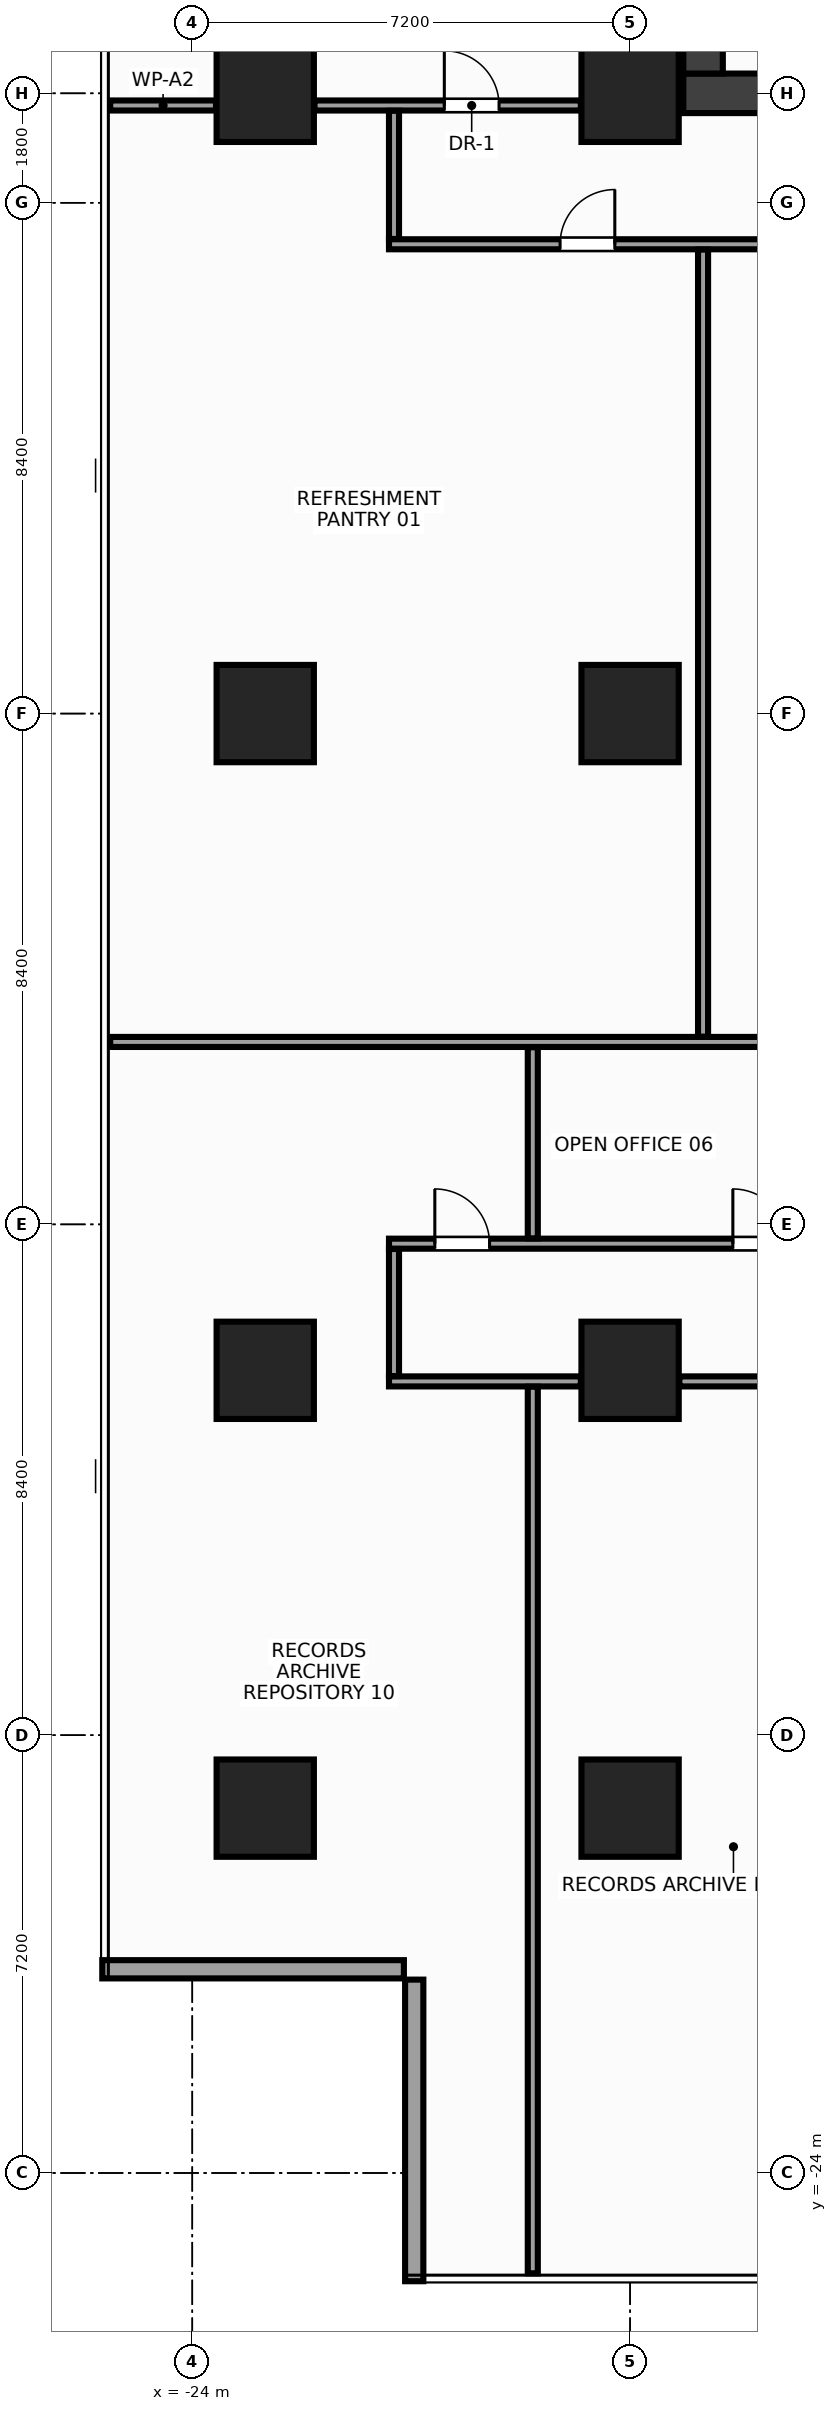
"""IFC4 building model, lengths in metres.
Left out: names, types, materials, properties, quantities, classifications, styles, units other than length and angle.
Written with IfcOpenShell. Run it as: python <this file> out.ifc"""

import sys

from ifc_helpers import new_model, si_unit, direction, frame, frame_2d, origin, origin_2d, place, context, subcontext, project, spatial, rectangle, extrude, source, transform, mapped, element, fill, save


model = new_model("IFC4")
c1 = context("Model", 3, precision=1e-05, world=origin(), true_north=direction((0.0, 1.0)))
c2 = subcontext(c1, "Body", "Model", "MODEL_VIEW")
j1 = project(units=[si_unit("LENGTHUNIT", "METRE"), si_unit("PLANEANGLEUNIT", "RADIAN")], contexts=[c1])
p1 = place(None, origin())
s1 = spatial("IfcSite", under=j1, at=p1, CompositionType="ELEMENT")
p2 = place(p1, origin())
s2 = spatial("IfcBuilding", under=s1, at=p2, CompositionType="ELEMENT")
p3 = place(p2, frame((0.0, 0.0, 110.0)))
s3 = spatial("IfcBuildingStorey", under=s2, at=p3, CompositionType="ELEMENT", Elevation=110.0)
m1 = source(origin(), c2, "Body", "SweptSolid", [
    extrude(rectangle(XDim=31.85, YDim=0.65, at=frame_2d((15.925, 0.0))), origin(), (0.0, 0.0, 1.0), 3.6),
])
p4 = place(p3, frame((-15.925, 10.2, 0.0), z_axis=(0.0, 0.0, 1.0), x_axis=(1.0, 0.0, 0.0)))
e1 = element("IfcWall", 1, at=p4, inside=s3, PredefinedType="SHEAR", context=c2, shape_type="MappedRepresentation", body=[
    mapped(m1, transform((0.0, 0.0, 0.0), x_axis=(1.0, 0.0, 0.0), y_axis=(0.0, 1.0, 0.0), z_axis=(0.0, 0.0, 1.0), scale=1.0)),
])
p5 = place(p4, frame((1.775, 0.0, 0.0)))
e2 = element("IfcOpeningElement", 2, at=p5, cuts=e1, PredefinedType="OPENING", context=c2, shape_type="SweptSolid", body=[
    extrude(rectangle(XDim=1.6, YDim=2.15, at=frame_2d((0.8, 1.075))), frame((0.0, 0.337, 0.0), z_axis=(0.0, -1.0, 0.0), x_axis=(1.0, 0.0, 0.0)), (0.0, 0.0, 1.0), 0.674),
])
p6 = place(p4, frame((28.475, 0.0, 0.0)))
e3 = element("IfcOpeningElement", 3, at=p6, cuts=e1, PredefinedType="OPENING", context=c2, shape_type="SweptSolid", body=[
    extrude(rectangle(XDim=1.6, YDim=2.15, at=frame_2d((0.8, 1.075))), frame((0.0, 0.337, 0.0), z_axis=(0.0, -1.0, 0.0), x_axis=(1.0, 0.0, 0.0)), (0.0, 0.0, 1.0), 0.674),
])
p7 = place(p4, frame((15.175, 0.0, 0.0)))
e4 = element("IfcOpeningElement", 4, at=p7, cuts=e1, PredefinedType="OPENING", context=c2, shape_type="SweptSolid", body=[
    extrude(rectangle(XDim=1.5, YDim=2.2, at=frame_2d((0.75, 1.1))), frame((0.0, 0.337, 0.0), z_axis=(0.0, -1.0, 0.0), x_axis=(1.0, 0.0, 0.0)), (0.0, 0.0, 1.0), 0.674),
])
m2 = source(origin(), c2, "Body", "SweptSolid", [
    extrude(rectangle(XDim=12.95, YDim=0.65, at=frame_2d((6.475, 0.0))), origin(), (0.0, 0.0, 1.0), 3.6),
])
p8 = place(p3, frame((-15.6, 10.525, 0.0), z_axis=(0.0, 0.0, 1.0), x_axis=(0.0, 1.0, 0.0)))
e5 = element("IfcWall", 5, at=p8, inside=s3, PredefinedType="SHEAR", context=c2, shape_type="MappedRepresentation", body=[
    mapped(m2, transform((0.0, 0.0, 0.0), x_axis=(1.0, 0.0, 0.0), y_axis=(0.0, 1.0, 0.0), z_axis=(0.0, 0.0, 1.0), scale=1.0)),
])
m3 = source(origin(), c2, "Body", "SweptSolid", [
    extrude(rectangle(XDim=1.6, YDim=1.6, at=origin_2d()), origin(), (0.0, 0.0, 1.0), 3.6),
])
for number, where, z_axis, x_axis in (
    (6, (-16.8, -18.0, 0.0), (0.0, 0.0, 1.0), (1.0, 0.0, 0.0)),
    (7, (-16.8, -10.8, 0.0), (0.0, 0.0, 1.0), (1.0, 0.0, 0.0)),
    (8, (-16.8, 0.0, 0.0), (0.0, 0.0, 1.0), (1.0, 0.0, 0.0)),
    (9, (-16.8, 10.2, 0.0), (0.0, 0.0, 1.0), (1.0, 0.0, 0.0)),
    (10, (-22.8, -18.0, 0.0), (0.0, 0.0, 1.0), (1.0, 0.0, 0.0)),
    (11, (-22.8, -10.8, 0.0), (0.0, 0.0, 1.0), (1.0, 0.0, 0.0)),
    (12, (-22.8, 0.0, 0.0), (0.0, 0.0, 1.0), (1.0, 0.0, 0.0)),
    (13, (-22.8, 10.2, 0.0), (0.0, 0.0, 1.0), (1.0, 0.0, 0.0)),
):
    element("IfcColumn", number, at=place(p3, frame(where, z_axis=z_axis, x_axis=x_axis)), inside=s3, PredefinedType="COLUMN", context=c2, shape_type="MappedRepresentation", body=[
        mapped(m3, transform((0.0, 0.0, 0.0), x_axis=(1.0, 0.0, 0.0), y_axis=(0.0, 1.0, 0.0), z_axis=(0.0, 0.0, 1.0), scale=1.0)),
    ])
m4 = source(origin(), c2, "Body", "SweptSolid", [
    extrude(rectangle(XDim=4.96, YDim=0.3, at=frame_2d((2.48, 0.0))), origin(), (0.0, 0.0, 1.0), 2.74),
])
for number, where, z_axis, x_axis in (
    (14, (-25.48, -20.65, 0.0), (0.0, 0.0, 1.0), (1.0, 0.0, 0.0)),
    (15, (-20.35, -20.82, 0.0), (0.0, 0.0, 1.0), (0.0, -1.0, 0.0)),
):
    element("IfcWall", number, at=place(p3, frame(where, z_axis=z_axis, x_axis=x_axis)), inside=s3, PredefinedType="STANDARD", context=c2, shape_type="MappedRepresentation", body=[
        mapped(m4, transform((0.0, 0.0, 0.0), x_axis=(1.0, 0.0, 0.0), y_axis=(0.0, 1.0, 0.0), z_axis=(0.0, 0.0, 1.0), scale=1.0)),
    ])
m5 = source(origin(), c2, "Body", "SweptSolid", [
    extrude(rectangle(XDim=1.74, YDim=0.165, at=frame_2d((0.87, 0.0))), origin(), (0.0, 0.0, 1.0), 3.36),
])
p9 = place(p3, frame((-25.35, 10.0, 0.0), z_axis=(0.0, 0.0, 1.0), x_axis=(1.0, 0.0, 0.0)))
e16 = element("IfcWall", 16, at=p9, inside=s3, PredefinedType="PARTITIONING", context=c2, shape_type="MappedRepresentation", body=[
    mapped(m5, transform((0.0, 0.0, 0.0), x_axis=(1.0, 0.0, 0.0), y_axis=(0.0, 1.0, 0.0), z_axis=(0.0, 0.0, 1.0), scale=1.0)),
])
m6 = source(origin(), c2, "Body", "SweptSolid", [
    extrude(rectangle(XDim=4.38, YDim=0.165, at=frame_2d((2.19, 0.0))), origin(), (0.0, 0.0, 1.0), 2.745),
])
p10 = place(p3, frame((-21.99, 10.0, 0.0), z_axis=(0.0, 0.0, 1.0), x_axis=(1.0, 0.0, 0.0)))
e17 = element("IfcWall", 17, at=p10, inside=s3, PredefinedType="PARTITIONING", context=c2, shape_type="MappedRepresentation", body=[
    mapped(m6, transform((0.0, 0.0, 0.0), x_axis=(1.0, 0.0, 0.0), y_axis=(0.0, 1.0, 0.0), z_axis=(0.0, 0.0, 1.0), scale=1.0)),
])
p11 = place(p10, frame((2.135, 0.0, 0.0)))
e18 = element("IfcOpeningElement", 18, at=p11, cuts=e17, PredefinedType="OPENING", context=c2, shape_type="SweptSolid", body=[
    extrude(rectangle(XDim=0.9, YDim=2.15, at=frame_2d((0.45, 1.075))), frame((0.0, 0.094, 0.0), z_axis=(0.0, -1.0, 0.0), x_axis=(1.0, 0.0, 0.0)), (0.0, 0.0, 1.0), 0.189),
])
m7 = source(origin(), c2, "Body", "SweptSolid", [
    extrude(rectangle(XDim=16.8, YDim=0.165, at=frame_2d((8.4, 0.0))), origin(), (0.0, 0.0, 1.0), 2.745),
])
p12 = place(p3, frame((-20.765, 7.718, 0.0), z_axis=(0.0, 0.0, 1.0), x_axis=(1.0, 0.0, 0.0)))
e19 = element("IfcWall", 19, at=p12, inside=s3, PredefinedType="PARTITIONING", context=c2, shape_type="MappedRepresentation", body=[
    mapped(m7, transform((0.0, 0.0, 0.0), x_axis=(1.0, 0.0, 0.0), y_axis=(0.0, 1.0, 0.0), z_axis=(0.0, 0.0, 1.0), scale=1.0)),
])
p13 = place(p12, frame((2.814, 0.0, 0.0)))
e20 = element("IfcOpeningElement", 20, at=p13, cuts=e19, PredefinedType="OPENING", context=c2, shape_type="SweptSolid", body=[
    extrude(rectangle(XDim=0.9, YDim=2.15, at=frame_2d((0.45, 1.075))), frame((0.0, 0.094, 0.0), z_axis=(0.0, -1.0, 0.0), x_axis=(1.0, 0.0, 0.0)), (0.0, 0.0, 1.0), 0.189),
])
p14 = place(p12, frame((10.514, 0.0, 0.0)))
e21 = element("IfcOpeningElement", 21, at=p14, cuts=e19, PredefinedType="OPENING", context=c2, shape_type="SweptSolid", body=[
    extrude(rectangle(XDim=0.9, YDim=2.15, at=frame_2d((0.45, 1.075))), frame((0.0, 0.094, 0.0), z_axis=(0.0, -1.0, 0.0), x_axis=(1.0, 0.0, 0.0)), (0.0, 0.0, 1.0), 0.189),
])
p15 = place(p3, frame((-20.765, -8.718, 0.0), z_axis=(0.0, 0.0, 1.0), x_axis=(1.0, 0.0, 0.0)))
e22 = element("IfcWall", 22, at=p15, inside=s3, PredefinedType="PARTITIONING", context=c2, shape_type="MappedRepresentation", body=[
    mapped(m7, transform((0.0, 0.0, 0.0), x_axis=(1.0, 0.0, 0.0), y_axis=(0.0, 1.0, 0.0), z_axis=(0.0, 0.0, 1.0), scale=1.0)),
])
p16 = place(p15, frame((5.655, 0.0, 0.0)))
e23 = element("IfcOpeningElement", 23, at=p16, cuts=e22, PredefinedType="OPENING", context=c2, shape_type="SweptSolid", body=[
    extrude(rectangle(XDim=0.9, YDim=2.15, at=frame_2d((0.45, 1.075))), frame((0.0, 0.094, 0.0), z_axis=(0.0, -1.0, 0.0), x_axis=(1.0, 0.0, 0.0)), (0.0, 0.0, 1.0), 0.189),
])
p17 = place(p15, frame((12.634, 0.0, 0.0)))
e24 = element("IfcOpeningElement", 24, at=p17, cuts=e22, PredefinedType="OPENING", context=c2, shape_type="SweptSolid", body=[
    extrude(rectangle(XDim=0.9, YDim=2.15, at=frame_2d((0.45, 1.075))), frame((0.0, 0.094, 0.0), z_axis=(0.0, -1.0, 0.0), x_axis=(1.0, 0.0, 0.0)), (0.0, 0.0, 1.0), 0.189),
])
p18 = place(p15, frame((0.754, 0.0, 0.0)))
e25 = element("IfcOpeningElement", 25, at=p18, cuts=e22, PredefinedType="OPENING", context=c2, shape_type="SweptSolid", body=[
    extrude(rectangle(XDim=0.9, YDim=2.15, at=frame_2d((0.45, 1.075))), frame((0.0, 0.094, 0.0), z_axis=(0.0, -1.0, 0.0), x_axis=(1.0, 0.0, 0.0)), (0.0, 0.0, 1.0), 0.189),
])
m8 = source(origin(), c2, "Body", "SweptSolid", [
    extrude(rectangle(XDim=3.155, YDim=0.165, at=frame_2d((1.577, 0.0))), origin(), (0.0, 0.0, 1.0), 2.745),
])
p19 = place(p3, frame((-20.765, -10.982, 0.0), z_axis=(0.0, 0.0, 1.0), x_axis=(1.0, 0.0, 0.0)))
e26 = element("IfcWall", 26, at=p19, inside=s3, PredefinedType="PARTITIONING", context=c2, shape_type="MappedRepresentation", body=[
    mapped(m8, transform((0.0, 0.0, 0.0), x_axis=(1.0, 0.0, 0.0), y_axis=(0.0, 1.0, 0.0), z_axis=(0.0, 0.0, 1.0), scale=1.0)),
])
m9 = source(origin(), c2, "Body", "SweptSolid", [
    extrude(rectangle(XDim=7.08, YDim=0.165, at=frame_2d((3.54, 0.0))), origin(), (0.0, 0.0, 1.0), 2.745),
])
p20 = place(p3, frame((-15.99, -10.982, 0.0), z_axis=(0.0, 0.0, 1.0), x_axis=(1.0, 0.0, 0.0)))
e27 = element("IfcWall", 27, at=p20, inside=s3, PredefinedType="PARTITIONING", context=c2, shape_type="MappedRepresentation", body=[
    mapped(m9, transform((0.0, 0.0, 0.0), x_axis=(1.0, 0.0, 0.0), y_axis=(0.0, 1.0, 0.0), z_axis=(0.0, 0.0, 1.0), scale=1.0)),
])
p21 = place(p20, frame((1.664, 0.0, 0.0)))
e28 = element("IfcOpeningElement", 28, at=p21, cuts=e27, PredefinedType="OPENING", context=c2, shape_type="SweptSolid", body=[
    extrude(rectangle(XDim=0.9, YDim=2.15, at=frame_2d((0.45, 1.075))), frame((0.0, 0.094, 0.0), z_axis=(0.0, -1.0, 0.0), x_axis=(1.0, 0.0, 0.0)), (0.0, 0.0, 1.0), 0.189),
])
p22 = place(p20, frame((4.946, 0.0, 0.0)))
e29 = element("IfcOpeningElement", 29, at=p22, cuts=e27, PredefinedType="OPENING", context=c2, shape_type="SweptSolid", body=[
    extrude(rectangle(XDim=0.9, YDim=2.15, at=frame_2d((0.45, 1.075))), frame((0.0, 0.094, 0.0), z_axis=(0.0, -1.0, 0.0), x_axis=(1.0, 0.0, 0.0)), (0.0, 0.0, 1.0), 0.189),
])
m10 = source(origin(), c2, "Body", "SweptSolid", [
    extrude(rectangle(XDim=2.108, YDim=0.165, at=frame_2d((1.054, 0.0))), origin(), (0.0, 0.0, 1.0), 3.36),
])
p23 = place(p3, frame((-20.683, 7.805, 0.0), z_axis=(0.0, 0.0, 1.0), x_axis=(0.0, 1.0, 0.0)))
e30 = element("IfcWall", 30, at=p23, inside=s3, PredefinedType="PARTITIONING", context=c2, shape_type="MappedRepresentation", body=[
    mapped(m10, transform((0.0, 0.0, 0.0), x_axis=(1.0, 0.0, 0.0), y_axis=(0.0, 1.0, 0.0), z_axis=(0.0, 0.0, 1.0), scale=1.0)),
])
m11 = source(origin(), c2, "Body", "SweptSolid", [
    extrude(rectangle(XDim=2.09, YDim=0.165, at=frame_2d((1.045, 0.0))), origin(), (0.0, 0.0, 1.0), 3.36),
])
p24 = place(p3, frame((-20.683, -10.895, 0.0), z_axis=(0.0, 0.0, 1.0), x_axis=(0.0, 1.0, 0.0)))
e31 = element("IfcWall", 31, at=p24, inside=s3, PredefinedType="PARTITIONING", context=c2, shape_type="MappedRepresentation", body=[
    mapped(m11, transform((0.0, 0.0, 0.0), x_axis=(1.0, 0.0, 0.0), y_axis=(0.0, 1.0, 0.0), z_axis=(0.0, 0.0, 1.0), scale=1.0)),
])
m12 = source(origin(), c2, "Body", "SweptSolid", [
    extrude(rectangle(XDim=21.38, YDim=0.165, at=frame_2d((10.69, 0.0))), origin(), (0.0, 0.0, 1.0), 2.745),
])
p25 = place(p3, frame((-25.35, -5.4, 0.0), z_axis=(0.0, 0.0, 1.0), x_axis=(1.0, 0.0, 0.0)))
e32 = element("IfcWall", 32, at=p25, inside=s3, PredefinedType="PARTITIONING", context=c2, shape_type="MappedRepresentation", body=[
    mapped(m12, transform((0.0, 0.0, 0.0), x_axis=(1.0, 0.0, 0.0), y_axis=(0.0, 1.0, 0.0), z_axis=(0.0, 0.0, 1.0), scale=1.0)),
])
m13 = source(origin(), c2, "Body", "SweptSolid", [
    extrude(rectangle(XDim=12.942, YDim=0.165, at=frame_2d((6.471, 0.0))), origin(), (0.0, 0.0, 1.0), 2.645),
])
p26 = place(p3, frame((-15.6, -5.312, 0.0), z_axis=(0.0, 0.0, 1.0), x_axis=(0.0, 1.0, 0.0)))
e33 = element("IfcWall", 33, at=p26, inside=s3, PredefinedType="PARTITIONING", context=c2, shape_type="MappedRepresentation", body=[
    mapped(m13, transform((0.0, 0.0, 0.0), x_axis=(1.0, 0.0, 0.0), y_axis=(0.0, 1.0, 0.0), z_axis=(0.0, 0.0, 1.0), scale=1.0)),
])
m14 = source(origin(), c2, "Body", "SweptSolid", [
    extrude(rectangle(XDim=14.58, YDim=0.165, at=frame_2d((7.29, 0.0))), origin(), (0.0, 0.0, 1.0), 2.745),
])
p27 = place(p3, frame((-18.4, -25.65, 0.0), z_axis=(0.0, 0.0, 1.0), x_axis=(0.0, 1.0, 0.0)))
e34 = element("IfcWall", 34, at=p27, inside=s3, PredefinedType="PARTITIONING", context=c2, shape_type="MappedRepresentation", body=[
    mapped(m14, transform((0.0, 0.0, 0.0), x_axis=(1.0, 0.0, 0.0), y_axis=(0.0, 1.0, 0.0), z_axis=(0.0, 0.0, 1.0), scale=1.0)),
])
m15 = source(origin(), c2, "Body", "SweptSolid", [
    extrude(rectangle(XDim=3.142, YDim=0.165, at=frame_2d((1.571, 0.0))), origin(), (0.0, 0.0, 1.0), 3.36),
])
p28 = place(p3, frame((-18.4, -8.63, 0.0), z_axis=(0.0, 0.0, 1.0), x_axis=(0.0, 1.0, 0.0)))
e35 = element("IfcWall", 35, at=p28, inside=s3, PredefinedType="PARTITIONING", context=c2, shape_type="MappedRepresentation", body=[
    mapped(m15, transform((0.0, 0.0, 0.0), x_axis=(1.0, 0.0, 0.0), y_axis=(0.0, 1.0, 0.0), z_axis=(0.0, 0.0, 1.0), scale=1.0)),
])
m16 = source(origin(), c2, "Body", "SweptSolid", [
    extrude(rectangle(XDim=0.9, YDim=2.15, at=frame_2d((0.45, 1.075))), frame((0.0, 0.025, 0.0), z_axis=(0.0, -1.0, 0.0), x_axis=(1.0, 0.0, 0.0)), (0.0, 0.0, 1.0), 0.05),
])
p29 = place(p11, origin())
e36 = element("IfcDoor", 36, at=p29, inside=s3, OperationType="SINGLE_SWING_LEFT", PredefinedType="DOOR", context=c2, shape_type="MappedRepresentation", body=[
    mapped(m16, transform((0.0, 0.0, 0.0), x_axis=(1.0, 0.0, 0.0), y_axis=(0.0, 1.0, 0.0), z_axis=(0.0, 0.0, 1.0), scale=1.0)),
])
fill(e18, e36)
p30 = place(p13, origin())
e37 = element("IfcDoor", 37, at=p30, inside=s3, OperationType="SINGLE_SWING_RIGHT", PredefinedType="DOOR", context=c2, shape_type="MappedRepresentation", body=[
    mapped(m16, transform((0.0, 0.0, 0.0), x_axis=(1.0, 0.0, 0.0), y_axis=(0.0, 1.0, 0.0), z_axis=(0.0, 0.0, 1.0), scale=1.0)),
])
fill(e20, e37)
p31 = place(p16, origin())
e38 = element("IfcDoor", 38, at=p31, inside=s3, OperationType="SINGLE_SWING_LEFT", PredefinedType="DOOR", context=c2, shape_type="MappedRepresentation", body=[
    mapped(m16, transform((0.0, 0.0, 0.0), x_axis=(1.0, 0.0, 0.0), y_axis=(0.0, 1.0, 0.0), z_axis=(0.0, 0.0, 1.0), scale=1.0)),
])
fill(e23, e38)
p32 = place(p18, origin())
e39 = element("IfcDoor", 39, at=p32, inside=s3, OperationType="SINGLE_SWING_LEFT", PredefinedType="DOOR", context=c2, shape_type="MappedRepresentation", body=[
    mapped(m16, transform((0.0, 0.0, 0.0), x_axis=(1.0, 0.0, 0.0), y_axis=(0.0, 1.0, 0.0), z_axis=(0.0, 0.0, 1.0), scale=1.0)),
])
fill(e25, e39)
save(model, sys.argv[1])
